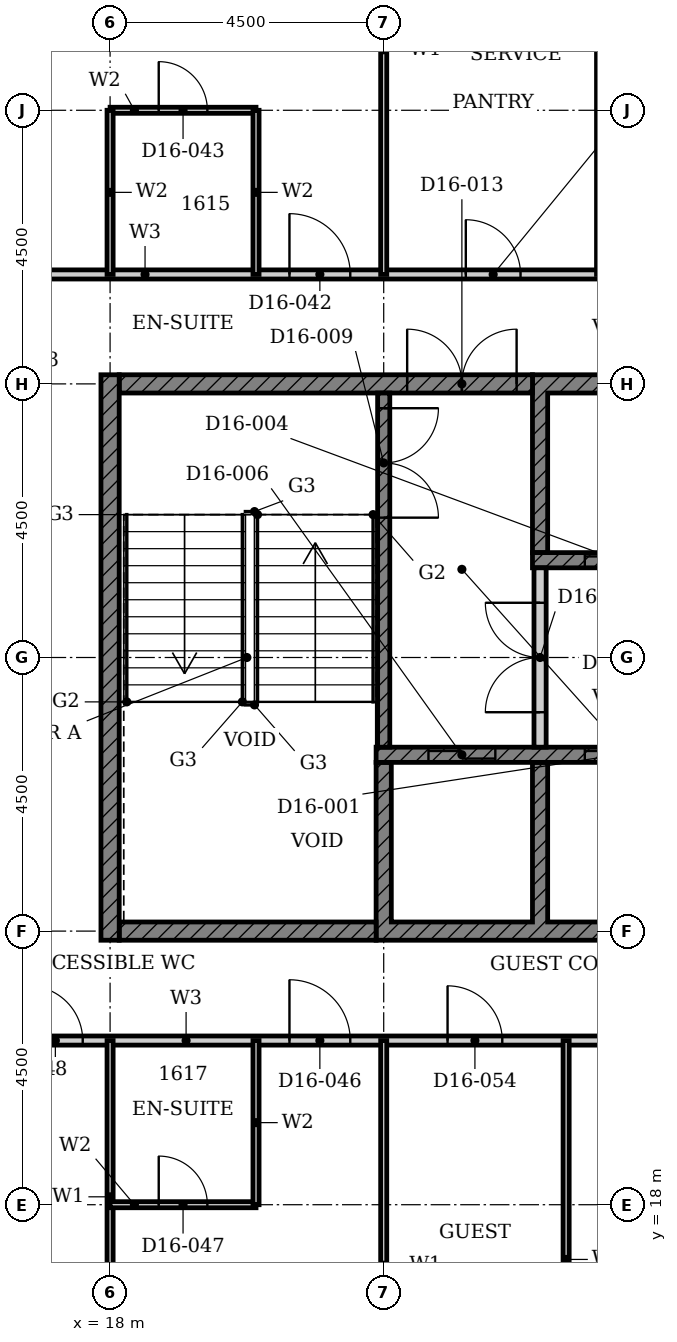
"""IFC4 building model, lengths in metres.
Left out: names, types, materials, properties, quantities, classifications, styles, units other than length and angle.
Written with IfcOpenShell. Run it as: python <this file> out.ifc"""

import sys

from ifc_helpers import new_model, si_unit, direction, frame, frame_2d, origin, place, context, subcontext, project, spatial, polyline, rectangle, outline, extrude, element, fill, save


model = new_model("IFC4")
c1 = context("Model", 3, precision=1e-05, world=origin(), true_north=direction((0.0, 1.0)))
c2 = subcontext(c1, "Body", "Model", "MODEL_VIEW")
j1 = project(units=[si_unit("LENGTHUNIT", "METRE"), si_unit("PLANEANGLEUNIT", "RADIAN")], contexts=[c1])
p1 = place(None, origin())
s1 = spatial("IfcSite", under=j1, at=p1, CompositionType="ELEMENT")
p2 = place(p1, origin())
s2 = spatial("IfcBuilding", under=s1, at=p2, CompositionType="ELEMENT")
p3 = place(p2, frame((0.0, 0.0, 70.8)))
s3 = spatial("IfcBuildingStorey", under=s2, at=p3, CompositionType="ELEMENT", Elevation=70.8)
p4 = place(p3, origin())
e1 = element("IfcWall", 1, at=p4, inside=s3, PredefinedType="SHEAR", context=c2, shape_type="SweptSolid", body=[
    extrude(outline(polyline([(22.375, 22.35), (38.053, 22.35), (38.053, 25.275), (37.803, 25.275), (37.803, 22.65), (35.482, 22.65), (35.482, 25.275), (35.232, 25.275), (35.232, 22.65), (32.911, 22.65), (32.911, 25.275), (32.661, 25.275), (32.661, 22.65), (30.339, 22.65), (30.339, 25.275), (30.089, 25.275), (30.089, 22.65), (27.768, 22.65), (27.768, 25.275), (27.518, 25.275), (27.518, 22.65), (25.197, 22.65), (25.197, 25.275), (24.947, 25.275), (24.947, 22.65), (22.625, 22.65), (22.625, 25.275), (22.375, 25.275), (22.375, 22.35)])), origin(), (0.0, 0.0, 1.0), 3.3),
])
p5 = place(p3, origin())
e2 = element("IfcWall", 2, at=p5, inside=s3, PredefinedType="SHEAR", context=c2, shape_type="SweptSolid", body=[
    extrude(outline(polyline([(24.947, 28.725), (25.197, 28.725), (25.197, 31.35), (27.518, 31.35), (27.518, 28.725), (27.768, 28.725), (27.768, 31.35), (30.089, 31.35), (30.089, 28.725), (30.339, 28.725), (30.339, 31.35), (32.661, 31.35), (32.661, 28.725), (32.911, 28.725), (32.911, 31.35), (35.232, 31.35), (35.232, 28.725), (35.482, 28.725), (35.482, 31.35), (37.803, 31.35), (37.803, 28.725), (38.053, 28.725), (38.053, 31.35), (40.375, 31.35), (40.375, 28.725), (40.625, 28.725), (40.625, 31.65), (24.947, 31.65), (24.947, 28.725)])), origin(), (0.0, 0.0, 1.0), 3.3),
])
p6 = place(p3, frame((18.15, 22.5, 0.0), z_axis=(0.0, 0.0, 1.0), x_axis=(1.0, 0.0, 0.0)))
e3 = element("IfcWall", 3, at=p6, inside=s3, PredefinedType="SHEAR", context=c2, shape_type="SweptSolid", body=[
    extrude(rectangle(XDim=4.225, YDim=0.3, at=frame_2d((2.113, 0.0))), origin(), (0.0, 0.0, 1.0), 3.3),
])
p7 = place(p3, frame((18.15, 31.5, 0.0), z_axis=(0.0, 0.0, 1.0), x_axis=(1.0, 0.0, 0.0)))
e4 = element("IfcWall", 4, at=p7, inside=s3, PredefinedType="SHEAR", context=c2, shape_type="SweptSolid", body=[
    extrude(rectangle(XDim=6.797, YDim=0.3, at=frame_2d((3.398, 0.0))), origin(), (0.0, 0.0, 1.0), 3.3),
])
p8 = place(p7, frame((4.736, 0.0, 0.0)))
e5 = element("IfcOpeningElement", 5, at=p8, cuts=e4, PredefinedType="OPENING", context=c2, shape_type="SweptSolid", body=[
    extrude(rectangle(XDim=1.8, YDim=2.1, at=frame_2d((0.9, 1.05))), frame((0.0, 0.16, 0.0), z_axis=(0.0, -1.0, 0.0), x_axis=(1.0, 0.0, 0.0)), (0.0, 0.0, 1.0), 0.32),
])
p9 = place(p3, frame((18.0, 22.35, 0.0), z_axis=(0.0, 0.0, 1.0), x_axis=(0.0, 1.0, 0.0)))
e6 = element("IfcWall", 6, at=p9, inside=s3, PredefinedType="SHEAR", context=c2, shape_type="SweptSolid", body=[
    extrude(rectangle(XDim=9.3, YDim=0.3, at=frame_2d((4.65, 0.0))), origin(), (0.0, 0.0, 1.0), 3.3),
])
p10 = place(p3, frame((22.375, 25.4, 0.0), z_axis=(0.0, 0.0, 1.0), x_axis=(1.0, 0.0, 0.0)))
e7 = element("IfcWall", 7, at=p10, inside=s3, PredefinedType="SHEAR", context=c2, shape_type="SweptSolid", body=[
    extrude(rectangle(XDim=15.678, YDim=0.25, at=frame_2d((7.839, 0.0))), origin(), (0.0, 0.0, 1.0), 3.3),
])
p11 = place(p10, frame((3.432, 0.0, 0.0)))
e8 = element("IfcOpeningElement", 8, at=p11, cuts=e7, PredefinedType="OPENING", context=c2, shape_type="SweptSolid", body=[
    extrude(rectangle(XDim=1.1, YDim=2.1, at=frame_2d((0.55, 1.05))), frame((0.0, 0.135, 0.0), z_axis=(0.0, -1.0, 0.0), x_axis=(1.0, 0.0, 0.0)), (0.0, 0.0, 1.0), 0.27),
])
p12 = place(p10, frame((11.146, 0.0, 0.0)))
e9 = element("IfcOpeningElement", 9, at=p12, cuts=e7, PredefinedType="OPENING", context=c2, shape_type="SweptSolid", body=[
    extrude(rectangle(XDim=1.1, YDim=2.1, at=frame_2d((0.55, 1.05))), frame((0.0, 0.135, 0.0), z_axis=(0.0, -1.0, 0.0), x_axis=(1.0, 0.0, 0.0)), (0.0, 0.0, 1.0), 0.27),
])
p13 = place(p10, frame((13.718, 0.0, 0.0)))
e10 = element("IfcOpeningElement", 10, at=p13, cuts=e7, PredefinedType="OPENING", context=c2, shape_type="SweptSolid", body=[
    extrude(rectangle(XDim=1.1, YDim=2.1, at=frame_2d((0.55, 1.05))), frame((0.0, 0.135, 0.0), z_axis=(0.0, -1.0, 0.0), x_axis=(1.0, 0.0, 0.0)), (0.0, 0.0, 1.0), 0.27),
])
p14 = place(p10, frame((0.861, 0.0, 0.0)))
e11 = element("IfcOpeningElement", 11, at=p14, cuts=e7, PredefinedType="OPENING", context=c2, shape_type="SweptSolid", body=[
    extrude(rectangle(XDim=1.1, YDim=2.1, at=frame_2d((0.55, 1.05))), frame((0.0, 0.135, 0.0), z_axis=(0.0, -1.0, 0.0), x_axis=(1.0, 0.0, 0.0)), (0.0, 0.0, 1.0), 0.27),
])
p15 = place(p3, frame((24.947, 28.6, 0.0), z_axis=(0.0, 0.0, 1.0), x_axis=(1.0, 0.0, 0.0)))
e12 = element("IfcWall", 12, at=p15, inside=s3, PredefinedType="SHEAR", context=c2, shape_type="SweptSolid", body=[
    extrude(rectangle(XDim=15.678, YDim=0.25, at=frame_2d((7.839, 0.0))), origin(), (0.0, 0.0, 1.0), 3.3),
])
p16 = place(p15, frame((0.861, 0.0, 0.0)))
e13 = element("IfcOpeningElement", 13, at=p16, cuts=e12, PredefinedType="OPENING", context=c2, shape_type="SweptSolid", body=[
    extrude(rectangle(XDim=1.1, YDim=2.1, at=frame_2d((0.55, 1.05))), frame((0.0, 0.135, 0.0), z_axis=(0.0, -1.0, 0.0), x_axis=(1.0, 0.0, 0.0)), (0.0, 0.0, 1.0), 0.27),
])
p17 = place(p15, frame((8.575, 0.0, 0.0)))
e14 = element("IfcOpeningElement", 14, at=p17, cuts=e12, PredefinedType="OPENING", context=c2, shape_type="SweptSolid", body=[
    extrude(rectangle(XDim=1.1, YDim=2.1, at=frame_2d((0.55, 1.05))), frame((0.0, 0.135, 0.0), z_axis=(0.0, -1.0, 0.0), x_axis=(1.0, 0.0, 0.0)), (0.0, 0.0, 1.0), 0.27),
])
p18 = place(p15, frame((13.718, 0.0, 0.0)))
e15 = element("IfcOpeningElement", 15, at=p18, cuts=e12, PredefinedType="OPENING", context=c2, shape_type="SweptSolid", body=[
    extrude(rectangle(XDim=1.1, YDim=2.1, at=frame_2d((0.55, 1.05))), frame((0.0, 0.135, 0.0), z_axis=(0.0, -1.0, 0.0), x_axis=(1.0, 0.0, 0.0)), (0.0, 0.0, 1.0), 0.27),
])
p19 = place(p3, frame((22.5, 31.35, 0.0), z_axis=(0.0, 0.0, 1.0), x_axis=(0.0, -1.0, 0.0)))
e16 = element("IfcWall", 16, at=p19, inside=s3, PredefinedType="SHEAR", context=c2, shape_type="SweptSolid", body=[
    extrude(rectangle(XDim=5.825, YDim=0.2, at=frame_2d((2.913, 0.0))), origin(), (0.0, 0.0, 1.0), 3.3),
])
p20 = place(p19, frame((0.25, 0.0, 0.0)))
e17 = element("IfcOpeningElement", 17, at=p20, cuts=e16, PredefinedType="OPENING", context=c2, shape_type="SweptSolid", body=[
    extrude(rectangle(XDim=1.8, YDim=2.1, at=frame_2d((0.9, 1.05))), frame((0.0, 0.11, 0.0), z_axis=(0.0, -1.0, 0.0), x_axis=(1.0, 0.0, 0.0)), (0.0, 0.0, 1.0), 0.22),
])
p21 = place(p3, frame((25.072, 25.525, 0.0), z_axis=(0.0, 0.0, 1.0), x_axis=(0.0, 1.0, 0.0)))
e18 = element("IfcWall", 18, at=p21, inside=s3, PredefinedType="PARTITIONING", context=c2, shape_type="SweptSolid", body=[
    extrude(rectangle(XDim=2.95, YDim=0.2, at=frame_2d((1.475, 0.0))), origin(), (0.0, 0.0, 1.0), 3.3),
])
p22 = place(p21, frame((0.575, 0.0, 0.0)))
e19 = element("IfcOpeningElement", 19, at=p22, cuts=e18, PredefinedType="OPENING", context=c2, shape_type="SweptSolid", body=[
    extrude(rectangle(XDim=1.8, YDim=2.1, at=frame_2d((0.9, 1.05))), frame((0.0, 0.11, 0.0), z_axis=(0.0, -1.0, 0.0), x_axis=(1.0, 0.0, 0.0)), (0.0, 0.0, 1.0), 0.22),
])
p23 = place(p3, frame((16.2, 20.7, 0.0), z_axis=(0.0, 0.0, 1.0), x_axis=(1.0, 0.0, 0.0)))
e20 = element("IfcWall", 20, at=p23, inside=s3, PredefinedType="PARTITIONING", context=c2, shape_type="SweptSolid", body=[
    extrude(rectangle(XDim=13.5, YDim=0.15, at=frame_2d((6.75, 0.0))), origin(), (0.0, 0.0, 1.0), 3.3),
])
p24 = place(p23, frame((4.75, 0.0, 0.0)))
e21 = element("IfcOpeningElement", 21, at=p24, cuts=e20, PredefinedType="OPENING", context=c2, shape_type="SweptSolid", body=[
    extrude(rectangle(XDim=1.0, YDim=2.1, at=frame_2d((0.5, 1.05))), frame((0.0, 0.085, 0.0), z_axis=(0.0, -1.0, 0.0), x_axis=(1.0, 0.0, 0.0)), (0.0, 0.0, 1.0), 0.17),
])
p25 = place(p23, frame((0.45, 0.0, 0.0)))
e22 = element("IfcOpeningElement", 22, at=p25, cuts=e20, PredefinedType="OPENING", context=c2, shape_type="SweptSolid", body=[
    extrude(rectangle(XDim=0.9, YDim=2.1, at=frame_2d((0.45, 1.05))), frame((0.0, 0.085, 0.0), z_axis=(0.0, -1.0, 0.0), x_axis=(1.0, 0.0, 0.0)), (0.0, 0.0, 1.0), 0.17),
])
p26 = place(p23, frame((7.35, 0.0, 0.0)))
e23 = element("IfcOpeningElement", 23, at=p26, cuts=e20, PredefinedType="OPENING", context=c2, shape_type="SweptSolid", body=[
    extrude(rectangle(XDim=0.9, YDim=2.1, at=frame_2d((0.45, 1.05))), frame((0.0, 0.085, 0.0), z_axis=(0.0, -1.0, 0.0), x_axis=(1.0, 0.0, 0.0)), (0.0, 0.0, 1.0), 0.17),
])
p27 = place(p23, frame((10.95, 0.0, 0.0)))
e24 = element("IfcOpeningElement", 24, at=p27, cuts=e20, PredefinedType="OPENING", context=c2, shape_type="SweptSolid", body=[
    extrude(rectangle(XDim=0.9, YDim=2.1, at=frame_2d((0.45, 1.05))), frame((0.0, 0.085, 0.0), z_axis=(0.0, -1.0, 0.0), x_axis=(1.0, 0.0, 0.0)), (0.0, 0.0, 1.0), 0.17),
])
p28 = place(p3, frame((16.2, 33.3, 0.0), z_axis=(0.0, 0.0, 1.0), x_axis=(1.0, 0.0, 0.0)))
e25 = element("IfcWall", 25, at=p28, inside=s3, PredefinedType="PARTITIONING", context=c2, shape_type="SweptSolid", body=[
    extrude(rectangle(XDim=9.9, YDim=0.15, at=frame_2d((4.95, 0.0))), origin(), (0.0, 0.0, 1.0), 3.3),
])
p29 = place(p28, frame((4.75, 0.0, 0.0)))
e26 = element("IfcOpeningElement", 26, at=p29, cuts=e25, PredefinedType="OPENING", context=c2, shape_type="SweptSolid", body=[
    extrude(rectangle(XDim=1.0, YDim=2.1, at=frame_2d((0.5, 1.05))), frame((0.0, 0.085, 0.0), z_axis=(0.0, -1.0, 0.0), x_axis=(1.0, 0.0, 0.0)), (0.0, 0.0, 1.0), 0.17),
])
p30 = place(p28, frame((7.65, 0.0, 0.0)))
e27 = element("IfcOpeningElement", 27, at=p30, cuts=e25, PredefinedType="OPENING", context=c2, shape_type="SweptSolid", body=[
    extrude(rectangle(XDim=0.9, YDim=2.1, at=frame_2d((0.45, 1.05))), frame((0.0, 0.085, 0.0), z_axis=(0.0, -1.0, 0.0), x_axis=(1.0, 0.0, 0.0)), (0.0, 0.0, 1.0), 0.17),
])
p31 = place(p3, frame((18.0, 15.56, 0.0), z_axis=(0.0, 0.0, 1.0), x_axis=(0.0, 1.0, 0.0)))
e28 = element("IfcWall", 28, at=p31, inside=s3, PredefinedType="PARTITIONING", context=c2, shape_type="SweptSolid", body=[
    extrude(rectangle(XDim=5.14, YDim=0.1, at=frame_2d((2.57, 0.0))), origin(), (0.0, 0.0, 1.0), 3.3),
])
for number, where, z_axis, x_axis in (
    (29, (22.5, 33.3, 0.0), (0.0, 0.0, 1.0), (0.0, 1.0, 0.0)),
    (30, (22.5, 13.31, 0.0), (0.0, 0.0, 1.0), (0.0, 1.0, 0.0)),
):
    element("IfcWall", number, at=place(p3, frame(where, z_axis=z_axis, x_axis=x_axis)), inside=s3, PredefinedType="PARTITIONING", context=c2, shape_type="SweptSolid", body=[
        extrude(rectangle(XDim=7.39, YDim=0.1, at=frame_2d((3.695, 0.0))), origin(), (0.0, 0.0, 1.0), 3.3),
    ])
p32 = place(p3, frame((25.5, 13.5, 0.0), z_axis=(0.0, 0.0, 1.0), x_axis=(0.0, 1.0, 0.0)))
e31 = element("IfcWall", 31, at=p32, inside=s3, PredefinedType="PARTITIONING", context=c2, shape_type="SweptSolid", body=[
    extrude(rectangle(XDim=7.2, YDim=0.1, at=frame_2d((3.6, 0.0))), origin(), (0.0, 0.0, 1.0), 3.3),
])
p33 = place(p3, frame((18.0, 18.0, 0.0), z_axis=(0.0, 0.0, 1.0), x_axis=(1.0, 0.0, 0.0)))
e32 = element("IfcWall", 32, at=p33, inside=s3, PredefinedType="PARTITIONING", context=c2, shape_type="SweptSolid", body=[
    extrude(rectangle(XDim=2.4, YDim=0.1, at=frame_2d((1.2, 0.0))), origin(), (0.0, 0.0, 1.0), 3.3),
])
p34 = place(p33, frame((0.8, 0.0, 0.0)))
e33 = element("IfcOpeningElement", 33, at=p34, cuts=e32, PredefinedType="OPENING", context=c2, shape_type="SweptSolid", body=[
    extrude(rectangle(XDim=0.8, YDim=2.1, at=frame_2d((0.4, 1.05))), frame((0.0, 0.06, 0.0), z_axis=(0.0, -1.0, 0.0), x_axis=(1.0, 0.0, 0.0)), (0.0, 0.0, 1.0), 0.12),
])
p35 = place(p3, frame((18.0, 36.0, 0.0), z_axis=(0.0, 0.0, 1.0), x_axis=(1.0, 0.0, 0.0)))
e34 = element("IfcWall", 34, at=p35, inside=s3, PredefinedType="PARTITIONING", context=c2, shape_type="SweptSolid", body=[
    extrude(rectangle(XDim=2.4, YDim=0.1, at=frame_2d((1.2, 0.0))), origin(), (0.0, 0.0, 1.0), 3.3),
])
p36 = place(p35, frame((0.8, 0.0, 0.0)))
e35 = element("IfcOpeningElement", 35, at=p36, cuts=e34, PredefinedType="OPENING", context=c2, shape_type="SweptSolid", body=[
    extrude(rectangle(XDim=0.8, YDim=2.1, at=frame_2d((0.4, 1.05))), frame((0.0, 0.06, 0.0), z_axis=(0.0, -1.0, 0.0), x_axis=(1.0, 0.0, 0.0)), (0.0, 0.0, 1.0), 0.12),
])
for number, where, z_axis, x_axis in (
    (36, (18.0, 33.3, 0.0), (0.0, 0.0, 1.0), (0.0, 1.0, 0.0)),
    (37, (20.4, 33.3, 0.0), (0.0, 0.0, 1.0), (0.0, 1.0, 0.0)),
    (38, (20.4, 18.0, 0.0), (0.0, 0.0, 1.0), (0.0, 1.0, 0.0)),
):
    element("IfcWall", number, at=place(p3, frame(where, z_axis=z_axis, x_axis=x_axis)), inside=s3, PredefinedType="PARTITIONING", context=c2, shape_type="SweptSolid", body=[
        extrude(rectangle(XDim=2.7, YDim=0.1, at=frame_2d((1.35, 0.0))), origin(), (0.0, 0.0, 1.0), 3.3),
    ])
p37 = place(p3, frame((26.1, 33.3, 0.0), z_axis=(0.0, 0.0, 1.0), x_axis=(0.0, 1.0, 0.0)))
e39 = element("IfcWall", 39, at=p37, inside=s3, PredefinedType="PARTITIONING", context=c2, shape_type="SweptSolid", body=[
    extrude(rectangle(XDim=7.2, YDim=0.2, at=frame_2d((3.6, 0.0))), origin(), (0.0, 0.0, 1.0), 3.3),
])
p38 = place(p11, origin())
e40 = element("IfcDoor", 40, at=p38, inside=s3, OperationType="DOUBLE_DOOR_SLIDING", PredefinedType="DOOR", context=c2, shape_type="SweptSolid", body=[
    extrude(rectangle(XDim=1.1, YDim=2.1, at=frame_2d((0.55, 1.05))), frame((0.0, 0.025, 0.0), z_axis=(0.0, -1.0, 0.0), x_axis=(1.0, 0.0, 0.0)), (0.0, 0.0, 1.0), 0.05),
])
fill(e8, e40)
p39 = place(p16, origin())
e41 = element("IfcDoor", 41, at=p39, inside=s3, OperationType="DOUBLE_DOOR_SLIDING", PredefinedType="DOOR", context=c2, shape_type="SweptSolid", body=[
    extrude(rectangle(XDim=1.1, YDim=2.1, at=frame_2d((0.55, 1.05))), frame((0.0, 0.025, 0.0), z_axis=(0.0, -1.0, 0.0), x_axis=(1.0, 0.0, 0.0)), (0.0, 0.0, 1.0), 0.05),
])
fill(e13, e41)
p40 = place(p14, origin())
e42 = element("IfcDoor", 42, at=p40, inside=s3, OperationType="DOUBLE_DOOR_SLIDING", PredefinedType="DOOR", context=c2, shape_type="SweptSolid", body=[
    extrude(rectangle(XDim=1.1, YDim=2.1, at=frame_2d((0.55, 1.05))), frame((0.0, 0.025, 0.0), z_axis=(0.0, -1.0, 0.0), x_axis=(1.0, 0.0, 0.0)), (0.0, 0.0, 1.0), 0.05),
])
fill(e11, e42)
p41 = place(p20, origin())
e43 = element("IfcDoor", 43, at=p41, inside=s3, OperationType="DOUBLE_DOOR_SINGLE_SWING", PredefinedType="DOOR", context=c2, shape_type="SweptSolid", body=[
    extrude(rectangle(XDim=1.8, YDim=2.1, at=frame_2d((0.9, 1.05))), frame((0.0, 0.025, 0.0), z_axis=(0.0, -1.0, 0.0), x_axis=(1.0, 0.0, 0.0)), (0.0, 0.0, 1.0), 0.05),
])
fill(e17, e43)
p42 = place(p22, origin())
e44 = element("IfcDoor", 44, at=p42, inside=s3, OperationType="DOUBLE_DOOR_SINGLE_SWING", PredefinedType="DOOR", context=c2, shape_type="SweptSolid", body=[
    extrude(rectangle(XDim=1.8, YDim=2.1, at=frame_2d((0.9, 1.05))), frame((0.0, 0.025, 0.0), z_axis=(0.0, -1.0, 0.0), x_axis=(1.0, 0.0, 0.0)), (0.0, 0.0, 1.0), 0.05),
])
fill(e19, e44)
p43 = place(p8, origin())
e45 = element("IfcDoor", 45, at=p43, inside=s3, OperationType="DOUBLE_DOOR_SINGLE_SWING", PredefinedType="DOOR", context=c2, shape_type="SweptSolid", body=[
    extrude(rectangle(XDim=1.8, YDim=2.1, at=frame_2d((0.9, 1.05))), frame((0.0, 0.025, 0.0), z_axis=(0.0, -1.0, 0.0), x_axis=(1.0, 0.0, 0.0)), (0.0, 0.0, 1.0), 0.05),
])
fill(e5, e45)
p44 = place(p29, origin())
e46 = element("IfcDoor", 46, at=p44, inside=s3, OperationType="SINGLE_SWING_RIGHT", PredefinedType="DOOR", context=c2, shape_type="SweptSolid", body=[
    extrude(rectangle(XDim=1.0, YDim=2.1, at=frame_2d((0.5, 1.05))), frame((0.0, 0.025, 0.0), z_axis=(0.0, -1.0, 0.0), x_axis=(1.0, 0.0, 0.0)), (0.0, 0.0, 1.0), 0.05),
])
fill(e26, e46)
p45 = place(p36, origin())
e47 = element("IfcDoor", 47, at=p45, inside=s3, OperationType="SINGLE_SWING_RIGHT", PredefinedType="DOOR", context=c2, shape_type="SweptSolid", body=[
    extrude(rectangle(XDim=0.8, YDim=2.1, at=frame_2d((0.4, 1.05))), frame((0.0, 0.025, 0.0), z_axis=(0.0, -1.0, 0.0), x_axis=(1.0, 0.0, 0.0)), (0.0, 0.0, 1.0), 0.05),
])
fill(e35, e47)
p46 = place(p24, origin())
e48 = element("IfcDoor", 48, at=p46, inside=s3, OperationType="SINGLE_SWING_RIGHT", PredefinedType="DOOR", context=c2, shape_type="SweptSolid", body=[
    extrude(rectangle(XDim=1.0, YDim=2.1, at=frame_2d((0.5, 1.05))), frame((0.0, 0.025, 0.0), z_axis=(0.0, -1.0, 0.0), x_axis=(1.0, 0.0, 0.0)), (0.0, 0.0, 1.0), 0.05),
])
fill(e21, e48)
p47 = place(p34, origin())
e49 = element("IfcDoor", 49, at=p47, inside=s3, OperationType="SINGLE_SWING_RIGHT", PredefinedType="DOOR", context=c2, shape_type="SweptSolid", body=[
    extrude(rectangle(XDim=0.8, YDim=2.1, at=frame_2d((0.4, 1.05))), frame((0.0, 0.025, 0.0), z_axis=(0.0, -1.0, 0.0), x_axis=(1.0, 0.0, 0.0)), (0.0, 0.0, 1.0), 0.05),
])
fill(e33, e49)
p48 = place(p25, origin())
e50 = element("IfcDoor", 50, at=p48, inside=s3, OperationType="SINGLE_SWING_RIGHT", PredefinedType="DOOR", context=c2, shape_type="SweptSolid", body=[
    extrude(rectangle(XDim=0.9, YDim=2.1, at=frame_2d((0.45, 1.05))), frame((0.0, 0.025, 0.0), z_axis=(0.0, -1.0, 0.0), x_axis=(1.0, 0.0, 0.0)), (0.0, 0.0, 1.0), 0.05),
])
fill(e22, e50)
p49 = place(p30, origin())
e51 = element("IfcDoor", 51, at=p49, inside=s3, OperationType="SINGLE_SWING_RIGHT", PredefinedType="DOOR", context=c2, shape_type="SweptSolid", body=[
    extrude(rectangle(XDim=0.9, YDim=2.1, at=frame_2d((0.45, 1.05))), frame((0.0, 0.025, 0.0), z_axis=(0.0, -1.0, 0.0), x_axis=(1.0, 0.0, 0.0)), (0.0, 0.0, 1.0), 0.05),
])
fill(e27, e51)
p50 = place(p26, origin())
e52 = element("IfcDoor", 52, at=p50, inside=s3, OperationType="SINGLE_SWING_LEFT", PredefinedType="DOOR", context=c2, shape_type="SweptSolid", body=[
    extrude(rectangle(XDim=0.9, YDim=2.1, at=frame_2d((0.45, 1.05))), frame((0.0, 0.025, 0.0), z_axis=(0.0, -1.0, 0.0), x_axis=(1.0, 0.0, 0.0)), (0.0, 0.0, 1.0), 0.05),
])
fill(e23, e52)
save(model, sys.argv[1])
